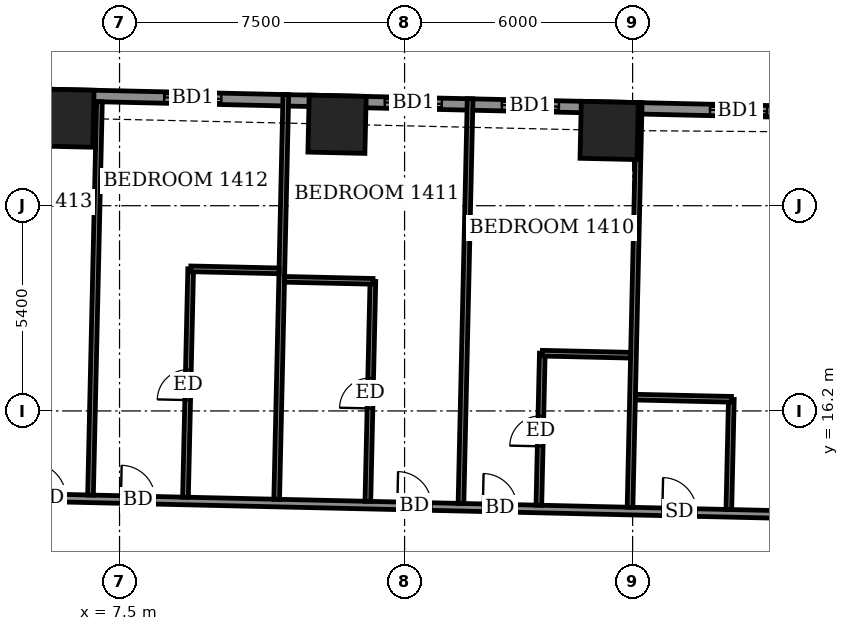
"""IFC4 building model, lengths in metres.
Left out: names, types, materials, properties, quantities, classifications, styles, units other than length and angle.
Written with IfcOpenShell. Run it as: python <this file> out.ifc"""

import sys

from ifc_helpers import new_model, si_unit, direction, frame, frame_2d, origin, origin_2d, place, context, subcontext, project, spatial, rectangle, extrude, element, fill, save


model = new_model("IFC4")
c1 = context("Model", 3, precision=1e-05, world=origin(), true_north=direction((0.0, 1.0)))
c2 = subcontext(c1, "Body", "Model", "MODEL_VIEW")
j1 = project(units=[si_unit("LENGTHUNIT", "METRE"), si_unit("PLANEANGLEUNIT", "RADIAN")], contexts=[c1])
p1 = place(None, origin())
s1 = spatial("IfcSite", under=j1, at=p1, CompositionType="ELEMENT")
p2 = place(p1, origin())
s2 = spatial("IfcBuilding", under=s1, at=p2, CompositionType="ELEMENT")
p3 = place(p2, frame((0.0, 0.0, 60.3)))
s3 = spatial("IfcBuildingStorey", under=s2, at=p3, CompositionType="ELEMENT", Elevation=60.3)
for number, where, z_axis, x_axis in (
    (1, (20.383, 23.58, -0.55), (0.0, 0.0, 1.0), (-1.0, 0.023, 0.0)),
    (2, (13.223, 23.743, -0.55), (0.0, 0.0, 1.0), (-1.0, 0.023, 0.0)),
    (3, (6.062, 23.905, -0.55), (0.0, 0.0, 1.0), (-1.0, 0.023, 0.0)),
):
    element("IfcColumn", number, at=place(p3, frame(where, z_axis=z_axis, x_axis=x_axis)), inside=s3, PredefinedType="COLUMN", context=c2, shape_type="SweptSolid", body=[
        extrude(rectangle(XDim=1.5, YDim=1.5, at=origin_2d()), origin(), (0.0, 0.0, 1.0), 3.6),
    ])
p4 = place(p3, frame((27.407, 24.021, 0.0), z_axis=(0.0, 0.0, 1.0), x_axis=(-0.99974239923, 0.022696589664, 0.0)))
e4 = element("IfcWall", 4, at=p4, inside=s3, PredefinedType="SOLIDWALL", context=c2, shape_type="SweptSolid", body=[
    extrude(rectangle(XDim=49.836, YDim=0.3, at=frame_2d((24.918, 0.0))), origin(), (0.0, 0.0, 1.0), 3.05),
])
p5 = place(p4, frame((2.871, 0.0, 0.0)))
e5 = element("IfcOpeningElement", 5, at=p5, cuts=e4, PredefinedType="OPENING", context=c2, shape_type="SweptSolid", body=[
    extrude(rectangle(XDim=1.5, YDim=2.4, at=frame_2d((0.75, 1.2))), frame((0.0, 0.16, 0.0), z_axis=(0.0, -1.0, 0.0), x_axis=(1.0, 0.0, 0.0)), (0.0, 0.0, 1.0), 0.32),
])
p6 = place(p4, frame((8.349, 0.0, 0.0)))
e6 = element("IfcOpeningElement", 6, at=p6, cuts=e4, PredefinedType="OPENING", context=c2, shape_type="SweptSolid", body=[
    extrude(rectangle(XDim=1.5, YDim=2.4, at=frame_2d((0.75, 1.2))), frame((0.0, 0.16, 0.0), z_axis=(0.0, -1.0, 0.0), x_axis=(1.0, 0.0, 0.0)), (0.0, 0.0, 1.0), 0.32),
])
p7 = place(p4, frame((11.43, 0.0, 0.0)))
e7 = element("IfcOpeningElement", 7, at=p7, cuts=e4, PredefinedType="OPENING", context=c2, shape_type="SweptSolid", body=[
    extrude(rectangle(XDim=1.5, YDim=2.4, at=frame_2d((0.75, 1.2))), frame((0.0, 0.16, 0.0), z_axis=(0.0, -1.0, 0.0), x_axis=(1.0, 0.0, 0.0)), (0.0, 0.0, 1.0), 0.32),
])
p8 = place(p4, frame((17.236, 0.0, 0.0)))
e8 = element("IfcOpeningElement", 8, at=p8, cuts=e4, PredefinedType="OPENING", context=c2, shape_type="SweptSolid", body=[
    extrude(rectangle(XDim=1.5, YDim=2.4, at=frame_2d((0.75, 1.2))), frame((0.0, 0.16, 0.0), z_axis=(0.0, -1.0, 0.0), x_axis=(1.0, 0.0, 0.0)), (0.0, 0.0, 1.0), 0.32),
])
p9 = place(p4, frame((22.686, 0.0, 0.0)))
e9 = element("IfcOpeningElement", 9, at=p9, cuts=e4, PredefinedType="OPENING", context=c2, shape_type="SweptSolid", body=[
    extrude(rectangle(XDim=1.5, YDim=2.4, at=frame_2d((0.75, 1.2))), frame((0.0, 0.16, 0.0), z_axis=(0.0, -1.0, 0.0), x_axis=(1.0, 0.0, 0.0)), (0.0, 0.0, 1.0), 0.32),
])
p10 = place(p4, frame((25.767, 0.0, 0.0)))
e10 = element("IfcOpeningElement", 10, at=p10, cuts=e4, PredefinedType="OPENING", context=c2, shape_type="SweptSolid", body=[
    extrude(rectangle(XDim=1.5, YDim=2.4, at=frame_2d((0.75, 1.2))), frame((0.0, 0.16, 0.0), z_axis=(0.0, -1.0, 0.0), x_axis=(1.0, 0.0, 0.0)), (0.0, 0.0, 1.0), 0.32),
])
p11 = place(p4, frame((31.211, 0.0, 0.0)))
e11 = element("IfcOpeningElement", 11, at=p11, cuts=e4, PredefinedType="OPENING", context=c2, shape_type="SweptSolid", body=[
    extrude(rectangle(XDim=1.5, YDim=2.4, at=frame_2d((0.75, 1.2))), frame((0.0, 0.16, 0.0), z_axis=(0.0, -1.0, 0.0), x_axis=(1.0, 0.0, 0.0)), (0.0, 0.0, 1.0), 0.32),
])
p12 = place(p4, frame((36.974, 0.0, 0.0)))
e12 = element("IfcOpeningElement", 12, at=p12, cuts=e4, PredefinedType="OPENING", context=c2, shape_type="SweptSolid", body=[
    extrude(rectangle(XDim=1.5, YDim=2.4, at=frame_2d((0.75, 1.2))), frame((0.0, 0.16, 0.0), z_axis=(0.0, -1.0, 0.0), x_axis=(1.0, 0.0, 0.0)), (0.0, 0.0, 1.0), 0.32),
])
p13 = place(p4, frame((40.055, 0.0, 0.0)))
e13 = element("IfcOpeningElement", 13, at=p13, cuts=e4, PredefinedType="OPENING", context=c2, shape_type="SweptSolid", body=[
    extrude(rectangle(XDim=1.5, YDim=2.4, at=frame_2d((0.75, 1.2))), frame((0.0, 0.16, 0.0), z_axis=(0.0, -1.0, 0.0), x_axis=(1.0, 0.0, 0.0)), (0.0, 0.0, 1.0), 0.32),
])
p14 = place(p4, frame((45.282, 0.0, 0.9)))
e14 = element("IfcOpeningElement", 14, at=p14, cuts=e4, PredefinedType="OPENING", context=c2, shape_type="SweptSolid", body=[
    extrude(rectangle(XDim=2.4, YDim=1.5, at=frame_2d((1.2, 0.75))), frame((0.0, 0.16, 0.0), z_axis=(0.0, -1.0, 0.0), x_axis=(1.0, 0.0, 0.0)), (0.0, 0.0, 1.0), 0.32),
])
p15 = place(p3, frame((-25.456, 14.618, 0.0), z_axis=(0.0, 0.0, 1.0), x_axis=(0.999742687583, -0.0226838847, 0.0)))
e15 = element("IfcWall", 15, at=p15, inside=s3, PredefinedType="PARTITIONING", context=c2, shape_type="SweptSolid", body=[
    extrude(rectangle(XDim=54.836, YDim=0.2, at=frame_2d((27.418, 0.0))), origin(), (0.0, 0.0, 1.0), 3.05),
])
p16 = place(p15, frame((52.493, 0.0, 0.0)))
e16 = element("IfcOpeningElement", 16, at=p16, cuts=e15, PredefinedType="OPENING", context=c2, shape_type="SweptSolid", body=[
    extrude(rectangle(XDim=1.0, YDim=2.1, at=frame_2d((0.5, 1.05))), frame((0.0, 0.11, 0.0), z_axis=(0.0, -1.0, 0.0), x_axis=(1.0, 0.0, 0.0)), (0.0, 0.0, 1.0), 0.22),
])
p17 = place(p15, frame((47.25, 0.0, 0.0)))
e17 = element("IfcOpeningElement", 17, at=p17, cuts=e15, PredefinedType="OPENING", context=c2, shape_type="SweptSolid", body=[
    extrude(rectangle(XDim=0.9, YDim=2.1, at=frame_2d((0.45, 1.05))), frame((0.0, 0.11, 0.0), z_axis=(0.0, -1.0, 0.0), x_axis=(1.0, 0.0, 0.0)), (0.0, 0.0, 1.0), 0.22),
])
p18 = place(p15, frame((42.525, 0.0, 0.0)))
e18 = element("IfcOpeningElement", 18, at=p18, cuts=e15, PredefinedType="OPENING", context=c2, shape_type="SweptSolid", body=[
    extrude(rectangle(XDim=0.9, YDim=2.1, at=frame_2d((0.45, 1.05))), frame((0.0, 0.11, 0.0), z_axis=(0.0, -1.0, 0.0), x_axis=(1.0, 0.0, 0.0)), (0.0, 0.0, 1.0), 0.22),
])
p19 = place(p15, frame((40.275, 0.0, 0.0)))
e19 = element("IfcOpeningElement", 19, at=p19, cuts=e15, PredefinedType="OPENING", context=c2, shape_type="SweptSolid", body=[
    extrude(rectangle(XDim=0.9, YDim=2.1, at=frame_2d((0.45, 1.05))), frame((0.0, 0.11, 0.0), z_axis=(0.0, -1.0, 0.0), x_axis=(1.0, 0.0, 0.0)), (0.0, 0.0, 1.0), 0.22),
])
p20 = place(p15, frame((33.0, 0.0, 0.0)))
e20 = element("IfcOpeningElement", 20, at=p20, cuts=e15, PredefinedType="OPENING", context=c2, shape_type="SweptSolid", body=[
    extrude(rectangle(XDim=0.9, YDim=2.1, at=frame_2d((0.45, 1.05))), frame((0.0, 0.11, 0.0), z_axis=(0.0, -1.0, 0.0), x_axis=(1.0, 0.0, 0.0)), (0.0, 0.0, 1.0), 0.22),
])
p21 = place(p15, frame((30.65, 0.0, 0.0)))
e21 = element("IfcOpeningElement", 21, at=p21, cuts=e15, PredefinedType="OPENING", context=c2, shape_type="SweptSolid", body=[
    extrude(rectangle(XDim=0.9, YDim=2.1, at=frame_2d((0.45, 1.05))), frame((0.0, 0.11, 0.0), z_axis=(0.0, -1.0, 0.0), x_axis=(1.0, 0.0, 0.0)), (0.0, 0.0, 1.0), 0.22),
])
p22 = place(p15, frame((23.7, 0.0, 0.0)))
e22 = element("IfcOpeningElement", 22, at=p22, cuts=e15, PredefinedType="OPENING", context=c2, shape_type="SweptSolid", body=[
    extrude(rectangle(XDim=0.9, YDim=2.1, at=frame_2d((0.45, 1.05))), frame((0.0, 0.11, 0.0), z_axis=(0.0, -1.0, 0.0), x_axis=(1.0, 0.0, 0.0)), (0.0, 0.0, 1.0), 0.22),
])
p23 = place(p15, frame((21.425, 0.0, 0.0)))
e23 = element("IfcOpeningElement", 23, at=p23, cuts=e15, PredefinedType="OPENING", context=c2, shape_type="SweptSolid", body=[
    extrude(rectangle(XDim=0.9, YDim=2.1, at=frame_2d((0.45, 1.05))), frame((0.0, 0.11, 0.0), z_axis=(0.0, -1.0, 0.0), x_axis=(1.0, 0.0, 0.0)), (0.0, 0.0, 1.0), 0.22),
])
p24 = place(p15, frame((14.15, 0.0, 0.0)))
e24 = element("IfcOpeningElement", 24, at=p24, cuts=e15, PredefinedType="OPENING", context=c2, shape_type="SweptSolid", body=[
    extrude(rectangle(XDim=0.9, YDim=2.1, at=frame_2d((0.45, 1.05))), frame((0.0, 0.11, 0.0), z_axis=(0.0, -1.0, 0.0), x_axis=(1.0, 0.0, 0.0)), (0.0, 0.0, 1.0), 0.22),
])
p25 = place(p15, frame((11.625, 0.0, 0.0)))
e25 = element("IfcOpeningElement", 25, at=p25, cuts=e15, PredefinedType="OPENING", context=c2, shape_type="SweptSolid", body=[
    extrude(rectangle(XDim=0.9, YDim=2.1, at=frame_2d((0.45, 1.05))), frame((0.0, 0.11, 0.0), z_axis=(0.0, -1.0, 0.0), x_axis=(1.0, 0.0, 0.0)), (0.0, 0.0, 1.0), 0.22),
])
p26 = place(p15, frame((1.425, 0.0, 0.0)))
e26 = element("IfcOpeningElement", 26, at=p26, cuts=e15, PredefinedType="OPENING", context=c2, shape_type="SweptSolid", body=[
    extrude(rectangle(XDim=1.0, YDim=2.1, at=frame_2d((0.5, 1.05))), frame((0.0, 0.11, 0.0), z_axis=(0.0, -1.0, 0.0), x_axis=(1.0, 0.0, 0.0)), (0.0, 0.0, 1.0), 0.22),
])
p27 = place(p15, frame((6.75, 0.0, 0.0)))
e27 = element("IfcOpeningElement", 27, at=p27, cuts=e15, PredefinedType="OPENING", context=c2, shape_type="SweptSolid", body=[
    extrude(rectangle(XDim=0.9, YDim=2.1, at=frame_2d((0.45, 1.05))), frame((0.0, 0.11, 0.0), z_axis=(0.0, -1.0, 0.0), x_axis=(1.0, 0.0, 0.0)), (0.0, 0.0, 1.0), 0.22),
])
p28 = place(p3, frame((6.736, 13.988, 0.0), z_axis=(0.0, 0.0, 1.0), x_axis=(0.022693005506, 0.999742480592, 0.0)))
e28 = element("IfcWall", 28, at=p28, inside=s3, PredefinedType="PARTITIONING", context=c2, shape_type="SweptSolid", body=[
    extrude(rectangle(XDim=10.35, YDim=0.15, at=frame_2d((5.175, 0.0))), origin(), (0.0, 0.0, 1.0), 2.55),
])
p29 = place(p3, frame((9.235, 13.931, 0.0), z_axis=(0.0, 0.0, 1.0), x_axis=(0.022790616683, 0.999740260163, 0.0)))
e29 = element("IfcWall", 29, at=p29, inside=s3, PredefinedType="PARTITIONING", context=c2, shape_type="SweptSolid", body=[
    extrude(rectangle(XDim=6.01, YDim=0.15, at=frame_2d((3.005, 0.0))), origin(), (0.0, 0.0, 1.0), 3.05),
])
p30 = place(p29, frame((2.555, 0.0, 0.0)))
e30 = element("IfcOpeningElement", 30, at=p30, cuts=e29, PredefinedType="OPENING", context=c2, shape_type="SweptSolid", body=[
    extrude(rectangle(XDim=0.8, YDim=2.1, at=frame_2d((0.4, 1.05))), frame((0.0, 0.085, 0.0), z_axis=(0.0, -1.0, 0.0), x_axis=(1.0, 0.0, 0.0)), (0.0, 0.0, 1.0), 0.17),
])
p31 = place(p3, frame((11.635, 13.876, 0.0), z_axis=(0.0, 0.0, 1.0), x_axis=(0.022624555408, 0.999744031986, 0.0)))
e31 = element("IfcWall", 31, at=p31, inside=s3, PredefinedType="PARTITIONING", context=c2, shape_type="SweptSolid", body=[
    extrude(rectangle(XDim=10.651, YDim=0.15, at=frame_2d((5.325, 0.0))), origin(), (0.0, 0.0, 1.0), 2.55),
])
p32 = place(p3, frame((14.034, 13.822, 0.0), z_axis=(0.0, 0.0, 1.0), x_axis=(0.022813362582, 0.999739741377, 0.0)))
e32 = element("IfcWall", 32, at=p32, inside=s3, PredefinedType="PARTITIONING", context=c2, shape_type="SweptSolid", body=[
    extrude(rectangle(XDim=5.79, YDim=0.15, at=frame_2d((2.895, 0.0))), origin(), (0.0, 0.0, 1.0), 3.05),
])
p33 = place(p32, frame((2.445, 0.0, 0.0)))
e33 = element("IfcOpeningElement", 33, at=p33, cuts=e32, PredefinedType="OPENING", context=c2, shape_type="SweptSolid", body=[
    extrude(rectangle(XDim=0.8, YDim=2.1, at=frame_2d((0.4, 1.05))), frame((0.0, 0.085, 0.0), z_axis=(0.0, -1.0, 0.0), x_axis=(1.0, 0.0, 0.0)), (0.0, 0.0, 1.0), 0.17),
])
p34 = place(p3, frame((16.484, 13.766, 0.0), z_axis=(0.0, 0.0, 1.0), x_axis=(0.022647466205, 0.999743513245, 0.0)))
e34 = element("IfcWall", 34, at=p34, inside=s3, PredefinedType="PARTITIONING", context=c2, shape_type="SweptSolid", body=[
    extrude(rectangle(XDim=10.651, YDim=0.15, at=frame_2d((5.325, 0.0))), origin(), (0.0, 0.0, 1.0), 2.55),
])
p35 = place(p3, frame((18.533, 13.72, 0.0), z_axis=(0.0, 0.0, 1.0), x_axis=(0.022765770952, 0.999740826251, 0.0)))
e35 = element("IfcWall", 35, at=p35, inside=s3, PredefinedType="PARTITIONING", context=c2, shape_type="SweptSolid", body=[
    extrude(rectangle(XDim=4.0, YDim=0.15, at=frame_2d((2.0, 0.0))), origin(), (0.0, 0.0, 1.0), 3.05),
])
p36 = place(p35, frame((1.55, 0.0, 0.0)))
e36 = element("IfcOpeningElement", 36, at=p36, cuts=e35, PredefinedType="OPENING", context=c2, shape_type="SweptSolid", body=[
    extrude(rectangle(XDim=0.8, YDim=2.1, at=frame_2d((0.4, 1.05))), frame((0.0, 0.085, 0.0), z_axis=(0.0, -1.0, 0.0), x_axis=(1.0, 0.0, 0.0)), (0.0, 0.0, 1.0), 0.17),
])
p37 = place(p3, frame((20.932, 13.665, 0.0), z_axis=(0.0, 0.0, 1.0), x_axis=(0.022739109038, 0.999741433032, 0.0)))
e37 = element("IfcWall", 37, at=p37, inside=s3, PredefinedType="PARTITIONING", context=c2, shape_type="SweptSolid", body=[
    extrude(rectangle(XDim=10.651, YDim=0.15, at=frame_2d((5.325, 0.0))), origin(), (0.0, 0.0, 1.0), 2.55),
])
p38 = place(p3, frame((23.532, 13.606, 0.0), z_axis=(0.0, 0.0, 1.0), x_axis=(0.022723317103, 0.999741792094, 0.0)))
e38 = element("IfcWall", 38, at=p38, inside=s3, PredefinedType="PARTITIONING", context=c2, shape_type="SweptSolid", body=[
    extrude(rectangle(XDim=2.901, YDim=0.15, at=frame_2d((1.45, 0.0))), origin(), (0.0, 0.0, 1.0), 3.05),
])
p39 = place(p3, frame((21.075, 16.563, 0.0), z_axis=(0.0, 0.0, 1.0), x_axis=(0.999746356616, -0.022521599255, 0.0)))
e39 = element("IfcWall", 39, at=p39, inside=s3, PredefinedType="PARTITIONING", context=c2, shape_type="SweptSolid", body=[
    extrude(rectangle(XDim=2.526, YDim=0.15, at=frame_2d((1.263, 0.0))), origin(), (0.0, 0.0, 1.0), 3.05),
])
p40 = place(p3, frame((18.626, 17.719, 0.0), z_axis=(0.0, 0.0, 1.0), x_axis=(0.999740260747, -0.02279059109, 0.0)))
e40 = element("IfcWall", 40, at=p40, inside=s3, PredefinedType="PARTITIONING", context=c2, shape_type="SweptSolid", body=[
    extrude(rectangle(XDim=2.324, YDim=0.15, at=frame_2d((1.162, 0.0))), origin(), (0.0, 0.0, 1.0), 3.05),
])
p41 = place(p3, frame((11.843, 19.663, 0.0), z_axis=(0.0, 0.0, 1.0), x_axis=(0.999740478815, -0.022781023197, 0.0)))
e41 = element("IfcWall", 41, at=p41, inside=s3, PredefinedType="PARTITIONING", context=c2, shape_type="SweptSolid", body=[
    extrude(rectangle(XDim=2.325, YDim=0.15, at=frame_2d((1.163, 0.0))), origin(), (0.0, 0.0, 1.0), 3.05),
])
p42 = place(p3, frame((9.374, 19.939, 0.0), z_axis=(0.0, 0.0, 1.0), x_axis=(0.999740260747, -0.02279059109, 0.0)))
e42 = element("IfcWall", 42, at=p42, inside=s3, PredefinedType="PARTITIONING", context=c2, shape_type="SweptSolid", body=[
    extrude(rectangle(XDim=2.324, YDim=0.15, at=frame_2d((1.162, 0.0))), origin(), (0.0, 0.0, 1.0), 3.05),
])
p43 = place(p5, origin())
e43 = element("IfcDoor", 43, at=p43, inside=s3, OperationType="SLIDING_TO_LEFT", PredefinedType="DOOR", context=c2, shape_type="SweptSolid", body=[
    extrude(rectangle(XDim=1.5, YDim=2.4, at=frame_2d((0.75, 1.2))), frame((0.0, 0.025, 0.0), z_axis=(0.0, -1.0, 0.0), x_axis=(1.0, 0.0, 0.0)), (0.0, 0.0, 1.0), 0.05),
])
fill(e5, e43)
p44 = place(p6, origin())
e44 = element("IfcDoor", 44, at=p44, inside=s3, OperationType="SLIDING_TO_LEFT", PredefinedType="DOOR", context=c2, shape_type="SweptSolid", body=[
    extrude(rectangle(XDim=1.5, YDim=2.4, at=frame_2d((0.75, 1.2))), frame((0.0, 0.025, 0.0), z_axis=(0.0, -1.0, 0.0), x_axis=(1.0, 0.0, 0.0)), (0.0, 0.0, 1.0), 0.05),
])
fill(e6, e44)
p45 = place(p7, origin())
e45 = element("IfcDoor", 45, at=p45, inside=s3, OperationType="SLIDING_TO_LEFT", PredefinedType="DOOR", context=c2, shape_type="SweptSolid", body=[
    extrude(rectangle(XDim=1.5, YDim=2.4, at=frame_2d((0.75, 1.2))), frame((0.0, 0.025, 0.0), z_axis=(0.0, -1.0, 0.0), x_axis=(1.0, 0.0, 0.0)), (0.0, 0.0, 1.0), 0.05),
])
fill(e7, e45)
p46 = place(p8, origin())
e46 = element("IfcDoor", 46, at=p46, inside=s3, OperationType="SLIDING_TO_LEFT", PredefinedType="DOOR", context=c2, shape_type="SweptSolid", body=[
    extrude(rectangle(XDim=1.5, YDim=2.4, at=frame_2d((0.75, 1.2))), frame((0.0, 0.025, 0.0), z_axis=(0.0, -1.0, 0.0), x_axis=(1.0, 0.0, 0.0)), (0.0, 0.0, 1.0), 0.05),
])
fill(e8, e46)
p47 = place(p17, origin())
e47 = element("IfcDoor", 47, at=p47, inside=s3, OperationType="SINGLE_SWING_LEFT", PredefinedType="DOOR", context=c2, shape_type="SweptSolid", body=[
    extrude(rectangle(XDim=0.9, YDim=2.1, at=frame_2d((0.45, 1.05))), frame((0.0, 0.025, 0.0), z_axis=(0.0, -1.0, 0.0), x_axis=(1.0, 0.0, 0.0)), (0.0, 0.0, 1.0), 0.05),
])
fill(e17, e47)
p48 = place(p18, origin())
e48 = element("IfcDoor", 48, at=p48, inside=s3, OperationType="SINGLE_SWING_RIGHT", PredefinedType="DOOR", context=c2, shape_type="SweptSolid", body=[
    extrude(rectangle(XDim=0.9, YDim=2.1, at=frame_2d((0.45, 1.05))), frame((0.0, 0.025, 0.0), z_axis=(0.0, -1.0, 0.0), x_axis=(1.0, 0.0, 0.0)), (0.0, 0.0, 1.0), 0.05),
])
fill(e18, e48)
p49 = place(p36, origin())
e49 = element("IfcDoor", 49, at=p49, inside=s3, OperationType="SINGLE_SWING_RIGHT", PredefinedType="DOOR", context=c2, shape_type="SweptSolid", body=[
    extrude(rectangle(XDim=0.8, YDim=2.1, at=frame_2d((0.4, 1.05))), frame((0.0, 0.025, 0.0), z_axis=(0.0, -1.0, 0.0), x_axis=(1.0, 0.0, 0.0)), (0.0, 0.0, 1.0), 0.05),
])
fill(e36, e49)
p50 = place(p19, origin())
e50 = element("IfcDoor", 50, at=p50, inside=s3, OperationType="SINGLE_SWING_LEFT", PredefinedType="DOOR", context=c2, shape_type="SweptSolid", body=[
    extrude(rectangle(XDim=0.9, YDim=2.1, at=frame_2d((0.45, 1.05))), frame((0.0, 0.025, 0.0), z_axis=(0.0, -1.0, 0.0), x_axis=(1.0, 0.0, 0.0)), (0.0, 0.0, 1.0), 0.05),
])
fill(e19, e50)
p51 = place(p33, origin())
e51 = element("IfcDoor", 51, at=p51, inside=s3, OperationType="SINGLE_SWING_LEFT", PredefinedType="DOOR", context=c2, shape_type="SweptSolid", body=[
    extrude(rectangle(XDim=0.8, YDim=2.1, at=frame_2d((0.4, 1.05))), frame((0.0, 0.025, 0.0), z_axis=(0.0, -1.0, 0.0), x_axis=(1.0, 0.0, 0.0)), (0.0, 0.0, 1.0), 0.05),
])
fill(e33, e51)
p52 = place(p20, origin())
e52 = element("IfcDoor", 52, at=p52, inside=s3, OperationType="SINGLE_SWING_RIGHT", PredefinedType="DOOR", context=c2, shape_type="SweptSolid", body=[
    extrude(rectangle(XDim=0.9, YDim=2.1, at=frame_2d((0.45, 1.05))), frame((0.0, 0.025, 0.0), z_axis=(0.0, -1.0, 0.0), x_axis=(1.0, 0.0, 0.0)), (0.0, 0.0, 1.0), 0.05),
])
fill(e20, e52)
p53 = place(p30, origin())
e53 = element("IfcDoor", 53, at=p53, inside=s3, OperationType="SINGLE_SWING_RIGHT", PredefinedType="DOOR", context=c2, shape_type="SweptSolid", body=[
    extrude(rectangle(XDim=0.8, YDim=2.1, at=frame_2d((0.4, 1.05))), frame((0.0, 0.025, 0.0), z_axis=(0.0, -1.0, 0.0), x_axis=(1.0, 0.0, 0.0)), (0.0, 0.0, 1.0), 0.05),
])
fill(e30, e53)
p54 = place(p21, origin())
e54 = element("IfcDoor", 54, at=p54, inside=s3, OperationType="SINGLE_SWING_LEFT", PredefinedType="DOOR", context=c2, shape_type="SweptSolid", body=[
    extrude(rectangle(XDim=0.9, YDim=2.1, at=frame_2d((0.45, 1.05))), frame((0.0, 0.025, 0.0), z_axis=(0.0, -1.0, 0.0), x_axis=(1.0, 0.0, 0.0)), (0.0, 0.0, 1.0), 0.05),
])
fill(e21, e54)
save(model, sys.argv[1])
